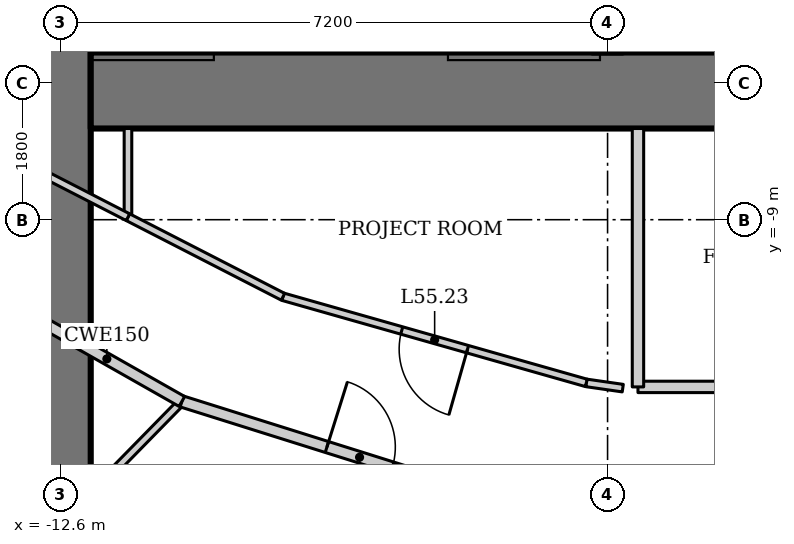
"""IFC4 building model, lengths in metres.
Left out: names, types, materials, properties, quantities, classifications, styles, units other than length and angle.
Written with IfcOpenShell. Run it as: python <this file> out.ifc"""

import sys

from ifc_helpers import new_model, si_unit, direction, frame, frame_2d, origin, place, context, subcontext, project, spatial, rectangle, extrude, element, fill, save


model = new_model("IFC4")
c1 = context("Model", 3, precision=1e-05, world=origin(), true_north=direction((0.0, 1.0)))
c2 = subcontext(c1, "Body", "Model", "MODEL_VIEW")
j1 = project(units=[si_unit("LENGTHUNIT", "METRE"), si_unit("PLANEANGLEUNIT", "RADIAN")], contexts=[c1])
p1 = place(None, origin())
s1 = spatial("IfcSite", under=j1, at=p1, CompositionType="ELEMENT")
p2 = place(p1, origin())
s2 = spatial("IfcBuilding", under=s1, at=p2, CompositionType="ELEMENT")
p3 = place(p2, frame((0.0, 0.0, 236.8)))
s3 = spatial("IfcBuildingStorey", under=s2, at=p3, CompositionType="ELEMENT", Elevation=236.8)
p4 = place(p3, frame((-12.6, 13.0, 0.0), z_axis=(0.0, 0.0, 1.0), x_axis=(0.0, -1.0, 0.0)))
e1 = element("IfcWall", 1, at=p4, inside=s3, PredefinedType="SHEAR", context=c2, shape_type="SweptSolid", body=[
    extrude(rectangle(XDim=26.0, YDim=0.8, at=frame_2d((13.0, 0.0))), origin(), (0.0, 0.0, 1.0), 4.2),
])
p5 = place(p4, frame((12.1, 0.0, 0.0)))
e2 = element("IfcOpeningElement", 2, at=p5, cuts=e1, PredefinedType="OPENING", context=c2, shape_type="SweptSolid", body=[
    extrude(rectangle(XDim=1.8, YDim=2.1, at=frame_2d((0.9, 1.05))), frame((0.0, 0.41, 0.0), z_axis=(0.0, -1.0, 0.0), x_axis=(1.0, 0.0, 0.0)), (0.0, 0.0, 1.0), 0.82),
])
p6 = place(p3, frame((-12.2, -7.3, 0.0), z_axis=(0.0, 0.0, 1.0), x_axis=(1.0, 0.0, 0.0)))
e3 = element("IfcWall", 3, at=p6, inside=s3, PredefinedType="SHEAR", context=c2, shape_type="SweptSolid", body=[
    extrude(rectangle(XDim=24.4, YDim=1.0, at=frame_2d((12.2, 0.0))), origin(), (0.0, 0.0, 1.0), 4.2),
])
p7 = place(p3, frame((-15.709, -16.199, 0.0), z_axis=(0.0, 0.0, 1.0), x_axis=(0.699758297028, 0.71437967898, 0.0)))
e4 = element("IfcWall", 4, at=p7, inside=s3, PredefinedType="PARTITIONING", context=c2, shape_type="SweptSolid", body=[
    extrude(rectangle(XDim=6.729, YDim=0.1, at=frame_2d((3.365, 0.0))), origin(), (0.0, 0.0, 1.0), 3.41),
])
p8 = place(p3, frame((-11.001, -11.392, 0.0), z_axis=(0.0, 0.0, 1.0), x_axis=(0.954031103669, -0.299707612903, 0.0)))
e5 = element("IfcWall", 5, at=p8, inside=s3, PredefinedType="PARTITIONING", context=c2, shape_type="SweptSolid", body=[
    extrude(rectangle(XDim=4.695, YDim=0.15, at=frame_2d((2.348, 0.0))), origin(), (0.0, 0.0, 1.0), 4.05),
])
p9 = place(p8, frame((2.0, 0.0, 0.0)))
e6 = element("IfcOpeningElement", 6, at=p9, cuts=e5, PredefinedType="OPENING", context=c2, shape_type="SweptSolid", body=[
    extrude(rectangle(XDim=0.9, YDim=2.1, at=frame_2d((0.45, 1.05))), frame((0.0, 0.085, 0.0), z_axis=(0.0, -1.0, 0.0), x_axis=(1.0, 0.0, 0.0)), (0.0, 0.0, 1.0), 0.17),
])
p10 = place(p3, frame((-5.0, -11.2, 0.0), z_axis=(0.0, 0.0, 1.0), x_axis=(1.0, 0.0, 0.0)))
e7 = element("IfcWall", 7, at=p10, inside=s3, PredefinedType="SOLIDWALL", context=c2, shape_type="SweptSolid", body=[
    extrude(rectangle(XDim=10.0, YDim=0.15, at=frame_2d((5.0, 0.0))), origin(), (0.0, 0.0, 1.0), 4.05),
])
p11 = place(p10, frame((1.25, 0.0, 0.0)))
e8 = element("IfcOpeningElement", 8, at=p11, cuts=e7, PredefinedType="OPENING", context=c2, shape_type="SweptSolid", body=[
    extrude(rectangle(XDim=0.9, YDim=2.1, at=frame_2d((0.45, 1.05))), frame((0.0, 0.085, 0.0), z_axis=(0.0, -1.0, 0.0), x_axis=(1.0, 0.0, 0.0)), (0.0, 0.0, 1.0), 0.17),
])
p12 = place(p10, frame((4.65, 0.0, 0.0)))
e9 = element("IfcOpeningElement", 9, at=p12, cuts=e7, PredefinedType="OPENING", context=c2, shape_type="SweptSolid", body=[
    extrude(rectangle(XDim=0.9, YDim=2.1, at=frame_2d((0.45, 1.05))), frame((0.0, 0.085, 0.0), z_axis=(0.0, -1.0, 0.0), x_axis=(1.0, 0.0, 0.0)), (0.0, 0.0, 1.0), 0.17),
])
p13 = place(p10, frame((7.25, 0.0, 0.0)))
e10 = element("IfcOpeningElement", 10, at=p13, cuts=e7, PredefinedType="OPENING", context=c2, shape_type="SweptSolid", body=[
    extrude(rectangle(XDim=1.0, YDim=2.1, at=frame_2d((0.5, 1.05))), frame((0.0, 0.085, 0.0), z_axis=(0.0, -1.0, 0.0), x_axis=(1.0, 0.0, 0.0)), (0.0, 0.0, 1.0), 0.17),
])
p14 = place(p10, frame((8.95, 0.0, 0.0)))
e11 = element("IfcOpeningElement", 11, at=p14, cuts=e7, PredefinedType="OPENING", context=c2, shape_type="SweptSolid", body=[
    extrude(rectangle(XDim=0.8, YDim=2.1, at=frame_2d((0.4, 1.05))), frame((0.0, 0.085, 0.0), z_axis=(0.0, -1.0, 0.0), x_axis=(1.0, 0.0, 0.0)), (0.0, 0.0, 1.0), 0.17),
])
p15 = place(p3, frame((-5.0, -7.8, 0.0), z_axis=(0.0, 0.0, 1.0), x_axis=(0.0, -1.0, 0.0)))
e12 = element("IfcWall", 12, at=p15, inside=s3, PredefinedType="SOLIDWALL", context=c2, shape_type="SweptSolid", body=[
    extrude(rectangle(XDim=3.4, YDim=0.15, at=frame_2d((1.7, 0.0))), origin(), (0.0, 0.0, 1.0), 4.05),
])
p16 = place(p3, frame((-11.71, -7.8, 0.0), z_axis=(0.0, 0.0, 1.0), x_axis=(0.0, -1.0, 0.0)))
e13 = element("IfcWall", 13, at=p16, inside=s3, PredefinedType="PARTITIONING", context=c2, shape_type="SweptSolid", body=[
    extrude(rectangle(XDim=1.167, YDim=0.1, at=frame_2d((0.583, 0.0))), origin(), (0.0, 0.0, 1.0), 4.05),
])
p17 = place(p3, frame((-5.2, -11.216, 0.0), z_axis=(0.0, 0.0, 1.0), x_axis=(-0.989797891768, 0.142478536811, 0.0)))
e14 = element("IfcWall", 14, at=p17, inside=s3, PredefinedType="PARTITIONING", context=c2, shape_type="SweptSolid", body=[
    extrude(rectangle(XDim=0.485, YDim=0.1, at=frame_2d((0.242, 0.0))), origin(), (0.0, 0.0, 1.0), 4.05),
])
p18 = place(p3, frame((-5.68, -11.147, 0.0), z_axis=(0.0, 0.0, 1.0), x_axis=(-0.961973498971, 0.273142796496, 0.0)))
e15 = element("IfcWall", 15, at=p18, inside=s3, PredefinedType="PARTITIONING", context=c2, shape_type="SweptSolid", body=[
    extrude(rectangle(XDim=4.148, YDim=0.1, at=frame_2d((2.074, 0.0))), origin(), (0.0, 0.0, 1.0), 4.05),
])
p19 = place(p18, frame((1.624, 0.0, 0.0)))
e16 = element("IfcOpeningElement", 16, at=p19, cuts=e15, PredefinedType="OPENING", context=c2, shape_type="SweptSolid", body=[
    extrude(rectangle(XDim=0.9, YDim=2.1, at=frame_2d((0.45, 1.05))), frame((0.0, 0.06, 0.0), z_axis=(0.0, -1.0, 0.0), x_axis=(1.0, 0.0, 0.0)), (0.0, 0.0, 1.0), 0.12),
])
p20 = place(p3, frame((-9.67, -10.014, 0.0), z_axis=(0.0, 0.0, 1.0), x_axis=(-0.889605609385, 0.456729525814, 0.0)))
e17 = element("IfcWall", 17, at=p20, inside=s3, PredefinedType="PARTITIONING", context=c2, shape_type="SweptSolid", body=[
    extrude(rectangle(XDim=2.293, YDim=0.1, at=frame_2d((1.146, 0.0))), origin(), (0.0, 0.0, 1.0), 4.05),
])
p21 = place(p3, frame((-12.975, -10.271, 0.0), z_axis=(0.0, 0.0, 1.0), x_axis=(0.869722107117, -0.493541747366, 0.0)))
e18 = element("IfcWall", 18, at=p21, inside=s3, PredefinedType="PARTITIONING", context=c2, shape_type="SweptSolid", body=[
    extrude(rectangle(XDim=2.27, YDim=0.15, at=frame_2d((1.135, 0.0))), origin(), (0.0, 0.0, 1.0), 4.05),
])
p22 = place(p3, frame((-11.71, -8.967, 0.0), z_axis=(0.0, 0.0, 1.0), x_axis=(-0.889638356137, 0.456665736935, 0.0)))
e19 = element("IfcWall", 19, at=p22, inside=s3, PredefinedType="PARTITIONING", context=c2, shape_type="SweptSolid", body=[
    extrude(rectangle(XDim=1.917, YDim=0.1, at=frame_2d((0.958, 0.0))), origin(), (0.0, 0.0, 1.0), 4.05),
])
p23 = place(p19, origin())
e20 = element("IfcDoor", 20, at=p23, inside=s3, OperationType="SINGLE_SWING_LEFT", PredefinedType="DOOR", context=c2, shape_type="SweptSolid", body=[
    extrude(rectangle(XDim=0.9, YDim=2.1, at=frame_2d((0.45, 1.05))), frame((0.0, 0.025, 0.0), z_axis=(0.0, -1.0, 0.0), x_axis=(1.0, 0.0, 0.0)), (0.0, 0.0, 1.0), 0.05),
])
fill(e16, e20)
p24 = place(p9, origin())
e21 = element("IfcDoor", 21, at=p24, inside=s3, OperationType="SINGLE_SWING_LEFT", PredefinedType="DOOR", context=c2, shape_type="SweptSolid", body=[
    extrude(rectangle(XDim=0.9, YDim=2.1, at=frame_2d((0.45, 1.05))), frame((0.0, 0.025, 0.0), z_axis=(0.0, -1.0, 0.0), x_axis=(1.0, 0.0, 0.0)), (0.0, 0.0, 1.0), 0.05),
])
fill(e6, e21)
save(model, sys.argv[1])
